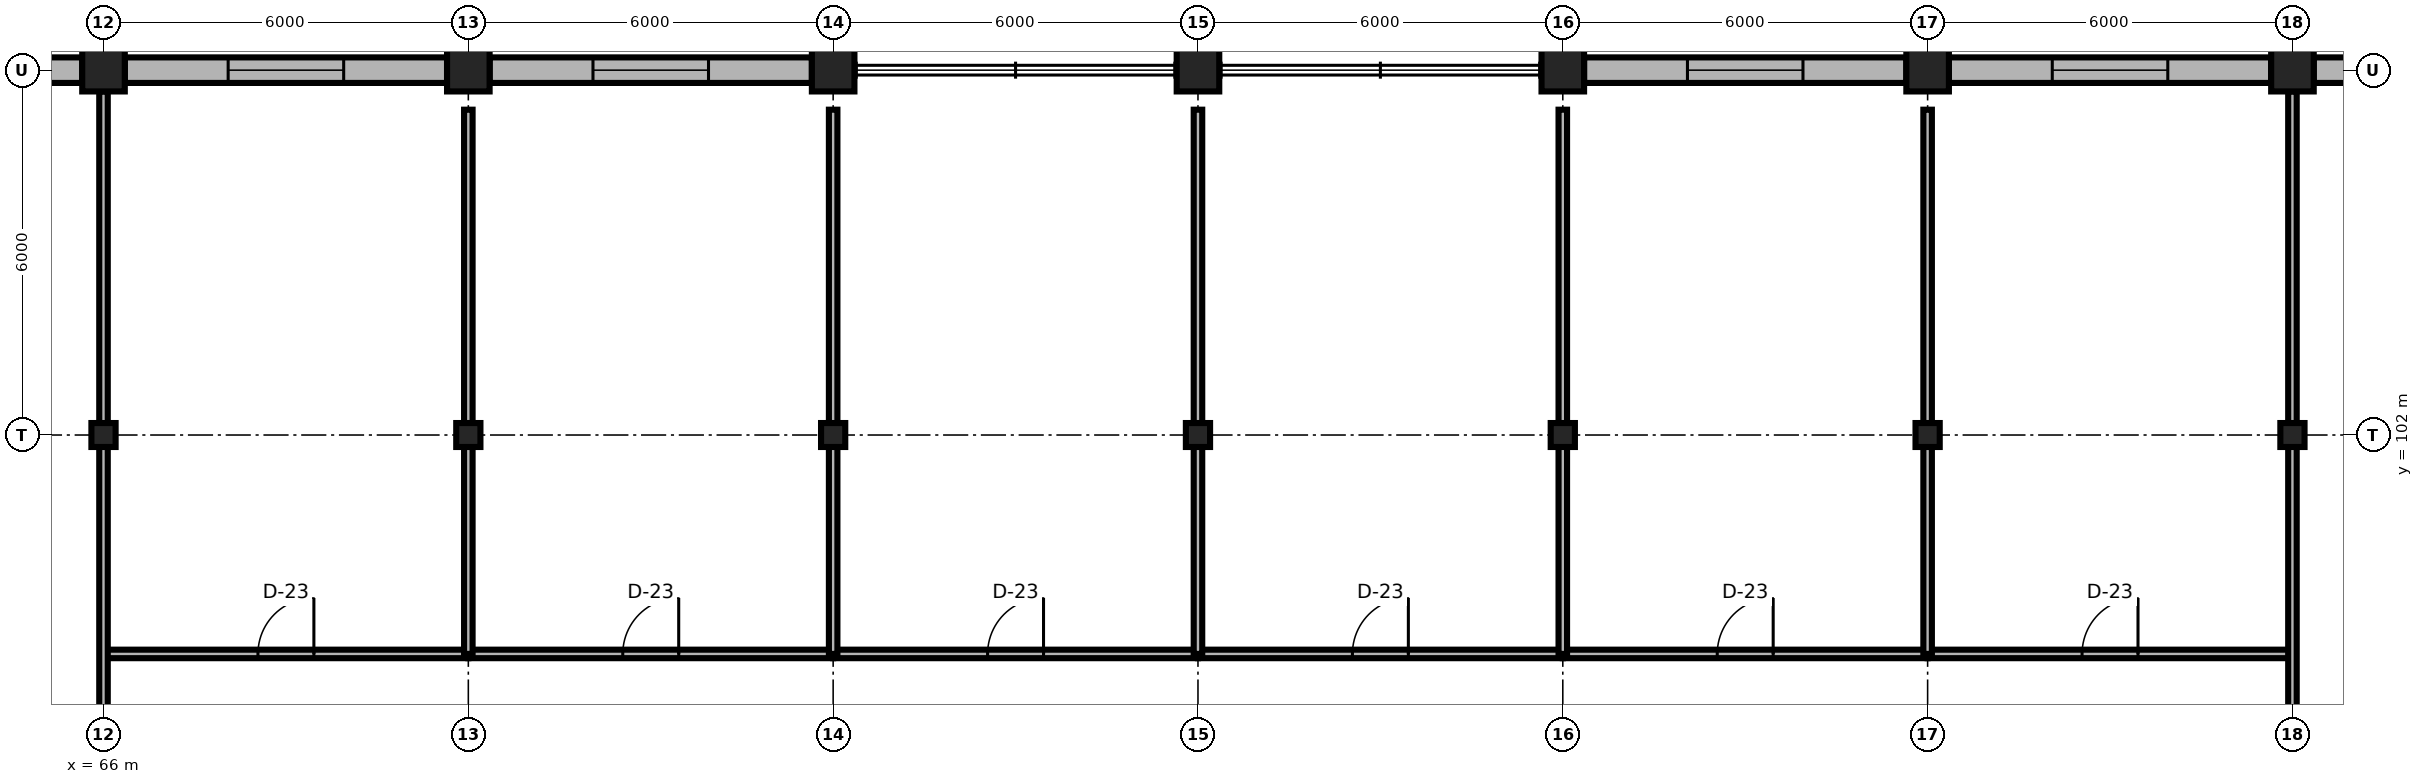
"""IFC4 building model, lengths in metres.
Left out: names, types, materials, properties, quantities, classifications, styles, units other than length and angle.
Written with IfcOpenShell. Run it as: python <this file> out.ifc"""

import sys

from ifc_helpers import new_model, si_unit, direction, frame, frame_2d, origin, origin_2d, place, context, subcontext, project, spatial, rectangle, i_section, extrude, element, fill, save


model = new_model("IFC4")
c1 = context("Model", 3, precision=1e-05, world=origin(), true_north=direction((0.0, 1.0)))
c2 = subcontext(c1, "Body", "Model", "MODEL_VIEW")
j1 = project(units=[si_unit("LENGTHUNIT", "METRE"), si_unit("PLANEANGLEUNIT", "RADIAN")], contexts=[c1])
p1 = place(None, origin())
s1 = spatial("IfcSite", under=j1, at=p1, CompositionType="ELEMENT")
p2 = place(p1, origin())
s2 = spatial("IfcBuilding", under=s1, at=p2, CompositionType="ELEMENT")
p3 = place(p2, frame((0.0, 0.0, 28.8)))
s3 = spatial("IfcBuildingStorey", under=s2, at=p3, CompositionType="ELEMENT", Elevation=28.8)
for number, where, z_axis, x_axis in (
    (1, (66.0, 102.0, 0.0), (0.0, 0.0, 1.0), (1.0, 0.0, 0.0)),
    (2, (72.0, 102.0, 0.0), (0.0, 0.0, 1.0), (1.0, 0.0, 0.0)),
    (3, (78.0, 102.0, 0.0), (0.0, 0.0, 1.0), (1.0, 0.0, 0.0)),
    (4, (84.0, 102.0, 0.0), (0.0, 0.0, 1.0), (1.0, 0.0, 0.0)),
    (5, (90.0, 102.0, 0.0), (0.0, 0.0, 1.0), (1.0, 0.0, 0.0)),
    (6, (96.0, 102.0, 0.0), (0.0, 0.0, 1.0), (1.0, 0.0, 0.0)),
    (7, (102.0, 102.0, 0.0), (0.0, 0.0, 1.0), (1.0, 0.0, 0.0)),
):
    element("IfcColumn", number, at=place(p3, frame(where, z_axis=z_axis, x_axis=x_axis)), inside=s3, PredefinedType="COLUMN", context=c2, shape_type="SweptSolid", body=[
        extrude(i_section(OverallWidth=0.398, OverallDepth=0.394, WebThickness=0.011, FlangeThickness=0.018, FilletRadius=0.022, at=origin_2d()), origin(), (0.0, 0.0, 1.0), 3.9),
    ])
for number, where, z_axis, x_axis in (
    (8, (66.0, 108.0, 0.0), (0.0, 0.0, 1.0), (1.0, 0.0, 0.0)),
    (9, (72.0, 108.0, 0.0), (0.0, 0.0, 1.0), (1.0, 0.0, 0.0)),
    (10, (78.0, 108.0, 0.0), (0.0, 0.0, 1.0), (1.0, 0.0, 0.0)),
    (11, (84.0, 108.0, 0.0), (0.0, 0.0, 1.0), (1.0, 0.0, 0.0)),
    (12, (90.0, 108.0, 0.0), (0.0, 0.0, 1.0), (1.0, 0.0, 0.0)),
    (13, (96.0, 108.0, 0.0), (0.0, 0.0, 1.0), (1.0, 0.0, 0.0)),
    (14, (102.0, 108.0, 0.0), (0.0, 0.0, 1.0), (1.0, 0.0, 0.0)),
):
    element("IfcColumn", number, at=place(p3, frame(where, z_axis=z_axis, x_axis=x_axis)), inside=s3, PredefinedType="COLUMN", context=c2, shape_type="SweptSolid", body=[
        extrude(rectangle(XDim=0.7, YDim=0.7, at=origin_2d()), origin(), (0.0, 0.0, 1.0), 3.9),
    ])
p4 = place(p3, frame((60.35, 108.0, 0.0), z_axis=(0.0, 0.0, 1.0), x_axis=(1.0, 0.0, 0.0)))
e15 = element("IfcWall", 15, at=p4, inside=s3, PredefinedType="SOLIDWALL", context=c2, shape_type="SweptSolid", body=[
    extrude(rectangle(XDim=5.3, YDim=0.42, at=frame_2d((2.65, 0.0))), origin(), (0.0, 0.0, 1.0), 3.32),
])
p5 = place(p4, frame((1.7, 0.0, 0.85)))
e16 = element("IfcOpeningElement", 16, at=p5, cuts=e15, PredefinedType="OPENING", context=c2, shape_type="SweptSolid", body=[
    extrude(rectangle(XDim=1.9, YDim=2.1, at=frame_2d((0.95, 1.05))), frame((0.0, 0.225, 0.0), z_axis=(0.0, -1.0, 0.0), x_axis=(1.0, 0.0, 0.0)), (0.0, 0.0, 1.0), 0.45),
])
p6 = place(p3, frame((66.35, 108.0, 0.0), z_axis=(0.0, 0.0, 1.0), x_axis=(1.0, 0.0, 0.0)))
e17 = element("IfcWall", 17, at=p6, inside=s3, PredefinedType="SOLIDWALL", context=c2, shape_type="SweptSolid", body=[
    extrude(rectangle(XDim=5.3, YDim=0.42, at=frame_2d((2.65, 0.0))), origin(), (0.0, 0.0, 1.0), 3.32),
])
p7 = place(p6, frame((1.7, 0.0, 0.85)))
e18 = element("IfcOpeningElement", 18, at=p7, cuts=e17, PredefinedType="OPENING", context=c2, shape_type="SweptSolid", body=[
    extrude(rectangle(XDim=1.9, YDim=2.1, at=frame_2d((0.95, 1.05))), frame((0.0, 0.225, 0.0), z_axis=(0.0, -1.0, 0.0), x_axis=(1.0, 0.0, 0.0)), (0.0, 0.0, 1.0), 0.45),
])
p8 = place(p3, frame((72.35, 108.0, 0.0), z_axis=(0.0, 0.0, 1.0), x_axis=(1.0, 0.0, 0.0)))
e19 = element("IfcWall", 19, at=p8, inside=s3, PredefinedType="SOLIDWALL", context=c2, shape_type="SweptSolid", body=[
    extrude(rectangle(XDim=5.3, YDim=0.42, at=frame_2d((2.65, 0.0))), origin(), (0.0, 0.0, 1.0), 3.32),
])
p9 = place(p8, frame((1.7, 0.0, 0.85)))
e20 = element("IfcOpeningElement", 20, at=p9, cuts=e19, PredefinedType="OPENING", context=c2, shape_type="SweptSolid", body=[
    extrude(rectangle(XDim=1.9, YDim=2.1, at=frame_2d((0.95, 1.05))), frame((0.0, 0.225, 0.0), z_axis=(0.0, -1.0, 0.0), x_axis=(1.0, 0.0, 0.0)), (0.0, 0.0, 1.0), 0.45),
])
p10 = place(p3, frame((90.35, 108.0, 0.0), z_axis=(0.0, 0.0, 1.0), x_axis=(1.0, 0.0, 0.0)))
e21 = element("IfcWall", 21, at=p10, inside=s3, PredefinedType="SOLIDWALL", context=c2, shape_type="SweptSolid", body=[
    extrude(rectangle(XDim=5.3, YDim=0.42, at=frame_2d((2.65, 0.0))), origin(), (0.0, 0.0, 1.0), 3.32),
])
p11 = place(p10, frame((1.7, 0.0, 0.85)))
e22 = element("IfcOpeningElement", 22, at=p11, cuts=e21, PredefinedType="OPENING", context=c2, shape_type="SweptSolid", body=[
    extrude(rectangle(XDim=1.9, YDim=2.1, at=frame_2d((0.95, 1.05))), frame((0.0, 0.225, 0.0), z_axis=(0.0, -1.0, 0.0), x_axis=(1.0, 0.0, 0.0)), (0.0, 0.0, 1.0), 0.45),
])
p12 = place(p3, frame((96.35, 108.0, 0.0), z_axis=(0.0, 0.0, 1.0), x_axis=(1.0, 0.0, 0.0)))
e23 = element("IfcWall", 23, at=p12, inside=s3, PredefinedType="SOLIDWALL", context=c2, shape_type="SweptSolid", body=[
    extrude(rectangle(XDim=5.3, YDim=0.42, at=frame_2d((2.65, 0.0))), origin(), (0.0, 0.0, 1.0), 3.32),
])
p13 = place(p12, frame((1.7, 0.0, 0.85)))
e24 = element("IfcOpeningElement", 24, at=p13, cuts=e23, PredefinedType="OPENING", context=c2, shape_type="SweptSolid", body=[
    extrude(rectangle(XDim=1.9, YDim=2.1, at=frame_2d((0.95, 1.05))), frame((0.0, 0.225, 0.0), z_axis=(0.0, -1.0, 0.0), x_axis=(1.0, 0.0, 0.0)), (0.0, 0.0, 1.0), 0.45),
])
p14 = place(p3, frame((102.35, 108.0, 0.0), z_axis=(0.0, 0.0, 1.0), x_axis=(1.0, 0.0, 0.0)))
e25 = element("IfcWall", 25, at=p14, inside=s3, PredefinedType="SOLIDWALL", context=c2, shape_type="SweptSolid", body=[
    extrude(rectangle(XDim=5.3, YDim=0.42, at=frame_2d((2.65, 0.0))), origin(), (0.0, 0.0, 1.0), 3.32),
])
p15 = place(p14, frame((1.7, 0.0, 0.85)))
e26 = element("IfcOpeningElement", 26, at=p15, cuts=e25, PredefinedType="OPENING", context=c2, shape_type="SweptSolid", body=[
    extrude(rectangle(XDim=1.9, YDim=2.1, at=frame_2d((0.95, 1.05))), frame((0.0, 0.225, 0.0), z_axis=(0.0, -1.0, 0.0), x_axis=(1.0, 0.0, 0.0)), (0.0, 0.0, 1.0), 0.45),
])
p16 = place(p3, frame((66.0, 98.4, 0.0), z_axis=(0.0, 0.0, 1.0), x_axis=(1.0, 0.0, 0.0)))
e27 = element("IfcWall", 27, at=p16, inside=s3, PredefinedType="PARTITIONING", context=c2, shape_type="SweptSolid", body=[
    extrude(rectangle(XDim=6.0, YDim=0.14, at=frame_2d((3.0, 0.0))), origin(), (0.0, 0.0, 1.0), 3.74),
])
p17 = place(p16, frame((2.54, 0.0, 0.0)))
e28 = element("IfcOpeningElement", 28, at=p17, cuts=e27, PredefinedType="OPENING", context=c2, shape_type="SweptSolid", body=[
    extrude(rectangle(XDim=0.92, YDim=2.15, at=frame_2d((0.46, 1.075))), frame((0.0, 0.085, 0.0), z_axis=(0.0, -1.0, 0.0), x_axis=(1.0, 0.0, 0.0)), (0.0, 0.0, 1.0), 0.17),
])
p18 = place(p3, frame((72.0, 98.4, 0.0), z_axis=(0.0, 0.0, 1.0), x_axis=(1.0, 0.0, 0.0)))
e29 = element("IfcWall", 29, at=p18, inside=s3, PredefinedType="PARTITIONING", context=c2, shape_type="SweptSolid", body=[
    extrude(rectangle(XDim=6.0, YDim=0.14, at=frame_2d((3.0, 0.0))), origin(), (0.0, 0.0, 1.0), 3.74),
])
p19 = place(p18, frame((2.54, 0.0, 0.0)))
e30 = element("IfcOpeningElement", 30, at=p19, cuts=e29, PredefinedType="OPENING", context=c2, shape_type="SweptSolid", body=[
    extrude(rectangle(XDim=0.92, YDim=2.15, at=frame_2d((0.46, 1.075))), frame((0.0, 0.085, 0.0), z_axis=(0.0, -1.0, 0.0), x_axis=(1.0, 0.0, 0.0)), (0.0, 0.0, 1.0), 0.17),
])
p20 = place(p3, frame((78.0, 98.4, 0.0), z_axis=(0.0, 0.0, 1.0), x_axis=(1.0, 0.0, 0.0)))
e31 = element("IfcWall", 31, at=p20, inside=s3, PredefinedType="PARTITIONING", context=c2, shape_type="SweptSolid", body=[
    extrude(rectangle(XDim=6.0, YDim=0.14, at=frame_2d((3.0, 0.0))), origin(), (0.0, 0.0, 1.0), 3.74),
])
p21 = place(p20, frame((2.54, 0.0, 0.0)))
e32 = element("IfcOpeningElement", 32, at=p21, cuts=e31, PredefinedType="OPENING", context=c2, shape_type="SweptSolid", body=[
    extrude(rectangle(XDim=0.92, YDim=2.15, at=frame_2d((0.46, 1.075))), frame((0.0, 0.085, 0.0), z_axis=(0.0, -1.0, 0.0), x_axis=(1.0, 0.0, 0.0)), (0.0, 0.0, 1.0), 0.17),
])
p22 = place(p3, frame((84.0, 98.4, 0.0), z_axis=(0.0, 0.0, 1.0), x_axis=(1.0, 0.0, 0.0)))
e33 = element("IfcWall", 33, at=p22, inside=s3, PredefinedType="PARTITIONING", context=c2, shape_type="SweptSolid", body=[
    extrude(rectangle(XDim=6.0, YDim=0.14, at=frame_2d((3.0, 0.0))), origin(), (0.0, 0.0, 1.0), 3.74),
])
p23 = place(p22, frame((2.54, 0.0, 0.0)))
e34 = element("IfcOpeningElement", 34, at=p23, cuts=e33, PredefinedType="OPENING", context=c2, shape_type="SweptSolid", body=[
    extrude(rectangle(XDim=0.92, YDim=2.15, at=frame_2d((0.46, 1.075))), frame((0.0, 0.085, 0.0), z_axis=(0.0, -1.0, 0.0), x_axis=(1.0, 0.0, 0.0)), (0.0, 0.0, 1.0), 0.17),
])
p24 = place(p3, frame((90.0, 98.4, 0.0), z_axis=(0.0, 0.0, 1.0), x_axis=(1.0, 0.0, 0.0)))
e35 = element("IfcWall", 35, at=p24, inside=s3, PredefinedType="PARTITIONING", context=c2, shape_type="SweptSolid", body=[
    extrude(rectangle(XDim=6.0, YDim=0.14, at=frame_2d((3.0, 0.0))), origin(), (0.0, 0.0, 1.0), 3.74),
])
p25 = place(p24, frame((2.54, 0.0, 0.0)))
e36 = element("IfcOpeningElement", 36, at=p25, cuts=e35, PredefinedType="OPENING", context=c2, shape_type="SweptSolid", body=[
    extrude(rectangle(XDim=0.92, YDim=2.15, at=frame_2d((0.46, 1.075))), frame((0.0, 0.085, 0.0), z_axis=(0.0, -1.0, 0.0), x_axis=(1.0, 0.0, 0.0)), (0.0, 0.0, 1.0), 0.17),
])
p26 = place(p3, frame((96.0, 98.4, 0.0), z_axis=(0.0, 0.0, 1.0), x_axis=(1.0, 0.0, 0.0)))
e37 = element("IfcWall", 37, at=p26, inside=s3, PredefinedType="PARTITIONING", context=c2, shape_type="SweptSolid", body=[
    extrude(rectangle(XDim=6.0, YDim=0.14, at=frame_2d((3.0, 0.0))), origin(), (0.0, 0.0, 1.0), 3.74),
])
p27 = place(p26, frame((2.54, 0.0, 0.0)))
e38 = element("IfcOpeningElement", 38, at=p27, cuts=e37, PredefinedType="OPENING", context=c2, shape_type="SweptSolid", body=[
    extrude(rectangle(XDim=0.92, YDim=2.15, at=frame_2d((0.46, 1.075))), frame((0.0, 0.085, 0.0), z_axis=(0.0, -1.0, 0.0), x_axis=(1.0, 0.0, 0.0)), (0.0, 0.0, 1.0), 0.17),
])
for number, where, z_axis, x_axis in (
    (39, (72.0, 98.4, 0.0), (0.0, 0.0, 1.0), (0.0, 1.0, 0.0)),
    (40, (78.0, 98.4, 0.0), (0.0, 0.0, 1.0), (0.0, 1.0, 0.0)),
    (41, (84.0, 98.4, 0.0), (0.0, 0.0, 1.0), (0.0, 1.0, 0.0)),
    (42, (90.0, 98.4, 0.0), (0.0, 0.0, 1.0), (0.0, 1.0, 0.0)),
    (43, (96.0, 98.4, 0.0), (0.0, 0.0, 1.0), (0.0, 1.0, 0.0)),
):
    element("IfcWall", number, at=place(p3, frame(where, z_axis=z_axis, x_axis=x_axis)), inside=s3, PredefinedType="PARTITIONING", context=c2, shape_type="SweptSolid", body=[
        extrude(rectangle(XDim=8.95, YDim=0.14, at=frame_2d((4.475, 0.0))), origin(), (0.0, 0.0, 1.0), 3.352),
    ])
for number, where, z_axis, x_axis in (
    (44, (66.0, 96.35, 0.0), (0.0, 0.0, 1.0), (0.0, 1.0, 0.0)),
    (45, (102.0, 96.35, 0.0), (0.0, 0.0, 1.0), (0.0, 1.0, 0.0)),
):
    element("IfcWall", number, at=place(p3, frame(where, z_axis=z_axis, x_axis=x_axis)), inside=s3, PredefinedType="PARTITIONING", context=c2, shape_type="SweptSolid", body=[
        extrude(rectangle(XDim=11.3, YDim=0.14, at=frame_2d((5.65, 0.0))), origin(), (0.0, 0.0, 1.0), 3.352),
    ])
p28 = place(p7, origin())
e46 = element("IfcWindow", 46, at=p28, inside=s3, PartitioningType="SINGLE_PANEL", PredefinedType="WINDOW", context=c2, shape_type="SweptSolid", body=[
    extrude(rectangle(XDim=1.9, YDim=2.1, at=frame_2d((0.95, 1.05))), frame((0.0, 0.03, 0.0), z_axis=(0.0, -1.0, 0.0), x_axis=(1.0, 0.0, 0.0)), (0.0, 0.0, 1.0), 0.06),
])
fill(e18, e46)
p29 = place(p9, origin())
e47 = element("IfcWindow", 47, at=p29, inside=s3, PartitioningType="SINGLE_PANEL", PredefinedType="WINDOW", context=c2, shape_type="SweptSolid", body=[
    extrude(rectangle(XDim=1.9, YDim=2.1, at=frame_2d((0.95, 1.05))), frame((0.0, 0.03, 0.0), z_axis=(0.0, -1.0, 0.0), x_axis=(1.0, 0.0, 0.0)), (0.0, 0.0, 1.0), 0.06),
])
fill(e20, e47)
p30 = place(p11, origin())
e48 = element("IfcWindow", 48, at=p30, inside=s3, PartitioningType="SINGLE_PANEL", PredefinedType="WINDOW", context=c2, shape_type="SweptSolid", body=[
    extrude(rectangle(XDim=1.9, YDim=2.1, at=frame_2d((0.95, 1.05))), frame((0.0, 0.03, 0.0), z_axis=(0.0, -1.0, 0.0), x_axis=(1.0, 0.0, 0.0)), (0.0, 0.0, 1.0), 0.06),
])
fill(e22, e48)
p31 = place(p13, origin())
e49 = element("IfcWindow", 49, at=p31, inside=s3, PartitioningType="SINGLE_PANEL", PredefinedType="WINDOW", context=c2, shape_type="SweptSolid", body=[
    extrude(rectangle(XDim=1.9, YDim=2.1, at=frame_2d((0.95, 1.05))), frame((0.0, 0.03, 0.0), z_axis=(0.0, -1.0, 0.0), x_axis=(1.0, 0.0, 0.0)), (0.0, 0.0, 1.0), 0.06),
])
fill(e24, e49)
p32 = place(p17, origin())
e50 = element("IfcDoor", 50, at=p32, inside=s3, OperationType="SINGLE_SWING_RIGHT", PredefinedType="DOOR", context=c2, shape_type="SweptSolid", body=[
    extrude(rectangle(XDim=0.92, YDim=2.15, at=frame_2d((0.46, 1.075))), frame((0.0, 0.025, 0.0), z_axis=(0.0, -1.0, 0.0), x_axis=(1.0, 0.0, 0.0)), (0.0, 0.0, 1.0), 0.05),
])
fill(e28, e50)
p33 = place(p19, origin())
e51 = element("IfcDoor", 51, at=p33, inside=s3, OperationType="SINGLE_SWING_RIGHT", PredefinedType="DOOR", context=c2, shape_type="SweptSolid", body=[
    extrude(rectangle(XDim=0.92, YDim=2.15, at=frame_2d((0.46, 1.075))), frame((0.0, 0.025, 0.0), z_axis=(0.0, -1.0, 0.0), x_axis=(1.0, 0.0, 0.0)), (0.0, 0.0, 1.0), 0.05),
])
fill(e30, e51)
p34 = place(p21, origin())
e52 = element("IfcDoor", 52, at=p34, inside=s3, OperationType="SINGLE_SWING_RIGHT", PredefinedType="DOOR", context=c2, shape_type="SweptSolid", body=[
    extrude(rectangle(XDim=0.92, YDim=2.15, at=frame_2d((0.46, 1.075))), frame((0.0, 0.025, 0.0), z_axis=(0.0, -1.0, 0.0), x_axis=(1.0, 0.0, 0.0)), (0.0, 0.0, 1.0), 0.05),
])
fill(e32, e52)
p35 = place(p23, origin())
e53 = element("IfcDoor", 53, at=p35, inside=s3, OperationType="SINGLE_SWING_RIGHT", PredefinedType="DOOR", context=c2, shape_type="SweptSolid", body=[
    extrude(rectangle(XDim=0.92, YDim=2.15, at=frame_2d((0.46, 1.075))), frame((0.0, 0.025, 0.0), z_axis=(0.0, -1.0, 0.0), x_axis=(1.0, 0.0, 0.0)), (0.0, 0.0, 1.0), 0.05),
])
fill(e34, e53)
p36 = place(p25, origin())
e54 = element("IfcDoor", 54, at=p36, inside=s3, OperationType="SINGLE_SWING_RIGHT", PredefinedType="DOOR", context=c2, shape_type="SweptSolid", body=[
    extrude(rectangle(XDim=0.92, YDim=2.15, at=frame_2d((0.46, 1.075))), frame((0.0, 0.025, 0.0), z_axis=(0.0, -1.0, 0.0), x_axis=(1.0, 0.0, 0.0)), (0.0, 0.0, 1.0), 0.05),
])
fill(e36, e54)
p37 = place(p27, origin())
e55 = element("IfcDoor", 55, at=p37, inside=s3, OperationType="SINGLE_SWING_RIGHT", PredefinedType="DOOR", context=c2, shape_type="SweptSolid", body=[
    extrude(rectangle(XDim=0.92, YDim=2.15, at=frame_2d((0.46, 1.075))), frame((0.0, 0.025, 0.0), z_axis=(0.0, -1.0, 0.0), x_axis=(1.0, 0.0, 0.0)), (0.0, 0.0, 1.0), 0.05),
])
fill(e38, e55)
save(model, sys.argv[1])
